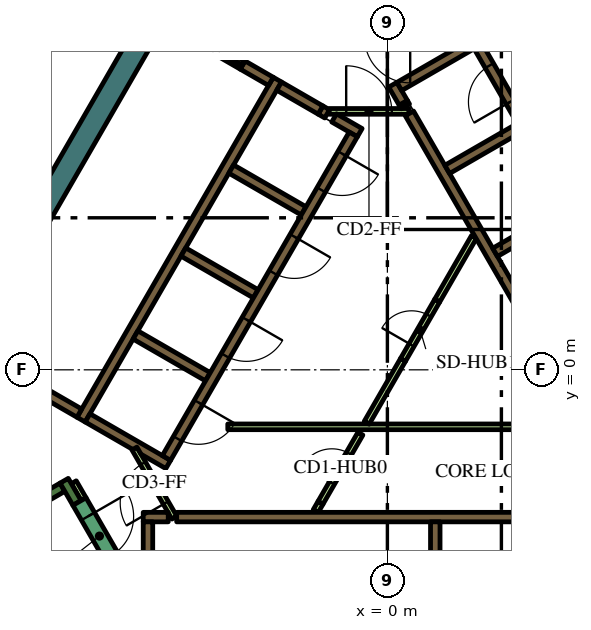
"""IFC4 building model, lengths in metres.
Left out: names, types, materials, properties, quantities, classifications, styles, units other than length and angle.
Written with IfcOpenShell. Run it as: python <this file> out.ifc"""

import sys

from ifc_helpers import new_model, si_unit, direction, frame, frame_2d, origin, place, context, subcontext, project, spatial, polyline, rectangle, outline, extrude, element, fill, save


model = new_model("IFC4")
c1 = context("Model", 3, precision=1e-05, world=origin(), true_north=direction((0.0, 1.0)))
c2 = subcontext(c1, "Body", "Model", "MODEL_VIEW")
j1 = project(units=[si_unit("LENGTHUNIT", "METRE"), si_unit("PLANEANGLEUNIT", "RADIAN")], contexts=[c1])
p1 = place(None, origin())
s1 = spatial("IfcSite", under=j1, at=p1, CompositionType="ELEMENT")
p2 = place(p1, origin())
s2 = spatial("IfcBuilding", under=s1, at=p2, CompositionType="ELEMENT")
p3 = place(p2, frame((0.0, 0.0, 327.6)))
s3 = spatial("IfcBuildingStorey", under=s2, at=p3, CompositionType="ELEMENT", Elevation=327.6)
p4 = place(p3, frame((1.989, 16.456, 0.0), z_axis=(0.0, 0.0, 1.0), x_axis=(0.49999102663, -0.8660305845, 0.0)))
e1 = element("IfcWall", 1, at=p4, inside=s3, PredefinedType="SOLIDWALL", context=c2, shape_type="SweptSolid", body=[
    extrude(rectangle(XDim=12.406, YDim=0.6, at=frame_2d((6.203, 0.0))), origin(), (0.0, 0.0, 1.0), 4.2),
])
p5 = place(p3, frame((-4.652, 11.842, 0.0), z_axis=(0.0, 0.0, 1.0), x_axis=(-0.500003640647, -0.866023301845, 0.0)))
e2 = element("IfcWall", 2, at=p5, inside=s3, PredefinedType="SOLIDWALL", context=c2, shape_type="SweptSolid", body=[
    extrude(rectangle(XDim=15.858, YDim=0.6, at=frame_2d((7.929, 0.0))), origin(), (0.0, 0.0, 1.0), 4.2),
])
p6 = place(p3, frame((-14.44, -6.49, 0.0), z_axis=(0.0, 0.0, 1.0), x_axis=(0.866022966069, 0.500004222222, 0.0)))
e3 = element("IfcWall", 3, at=p6, inside=s3, PredefinedType="SOLIDWALL", context=c2, shape_type="SweptSolid", body=[
    extrude(rectangle(XDim=6.8, YDim=0.25, at=frame_2d((3.4, 0.0))), origin(), (0.0, 0.0, 1.0), 4.2),
])
p7 = place(p3, frame((-8.168, -3.503, 0.0), z_axis=(0.0, 0.0, 1.0), x_axis=(-0.499952099219, 0.866053057547, 0.0)))
e4 = element("IfcWall", 4, at=p7, inside=s3, PredefinedType="SOLIDWALL", context=c2, shape_type="SweptSolid", body=[
    extrude(rectangle(XDim=0.675, YDim=0.25, at=frame_2d((0.337, 0.0))), origin(), (0.0, 0.0, 1.0), 4.2),
])
p8 = place(p3, frame((-5.545, -3.875, 0.0), z_axis=(0.0, 0.0, 1.0), x_axis=(1.0, 0.0, 0.0)))
e5 = element("IfcWall", 5, at=p8, inside=s3, PredefinedType="SOLIDWALL", context=c2, shape_type="SweptSolid", body=[
    extrude(rectangle(XDim=11.97, YDim=0.25, at=frame_2d((5.985, 0.0))), origin(), (0.0, 0.0, 1.0), 4.2),
])
p9 = place(p3, frame((-6.425, -3.875, 0.0), z_axis=(0.0, 0.0, 1.0), x_axis=(1.0, 0.0, 0.0)))
e6 = element("IfcWall", 6, at=p9, inside=s3, PredefinedType="SOLIDWALL", context=c2, shape_type="SweptSolid", body=[
    extrude(rectangle(XDim=0.658, YDim=0.25, at=frame_2d((0.329, 0.0))), origin(), (0.0, 0.0, 1.0), 4.2),
])
p10 = place(p3, frame((1.26, -4.0, 0.0), z_axis=(0.0, 0.0, 1.0), x_axis=(0.0, -1.0, 0.0)))
e7 = element("IfcWall", 7, at=p10, inside=s3, PredefinedType="SOLIDWALL", context=c2, shape_type="SweptSolid", body=[
    extrude(rectangle(XDim=2.2, YDim=0.25, at=frame_2d((1.1, 0.0))), origin(), (0.0, 0.0, 1.0), 4.2),
])
p11 = place(p3, frame((-6.3, -7.125, 0.0), z_axis=(0.0, 0.0, 1.0), x_axis=(0.0, 1.0, 0.0)))
e8 = element("IfcWall", 8, at=p11, inside=s3, PredefinedType="SOLIDWALL", context=c2, shape_type="SweptSolid", body=[
    extrude(rectangle(XDim=3.125, YDim=0.25, at=frame_2d((1.562, 0.0))), origin(), (0.0, 0.0, 1.0), 4.2),
])
p12 = place(p3, frame((0.473, 6.93, 0.0), z_axis=(0.0, 0.0, 1.0), x_axis=(-0.49972245349, 0.866185586049, 0.0)))
e9 = element("IfcWall", 9, at=p12, inside=s3, PredefinedType="SOLIDWALL", context=c2, shape_type="SweptSolid", body=[
    extrude(rectangle(XDim=0.11, YDim=0.25, at=frame_2d((0.055, 0.0))), origin(), (0.0, 0.0, 1.0), 4.2),
])
p13 = place(p3, frame((6.568, -3.627, 0.0), z_axis=(0.0, 0.0, 1.0), x_axis=(-0.499999455981, 0.866025717874, 0.0)))
e10 = element("IfcWall", 10, at=p13, inside=s3, PredefinedType="SOLIDWALL", context=c2, shape_type="SweptSolid", body=[
    extrude(rectangle(XDim=11.978, YDim=0.25, at=frame_2d((5.989, 0.0))), origin(), (0.0, 0.0, 1.0), 4.2),
])
p14 = place(p3, frame((0.417, 7.027, 0.0), z_axis=(0.0, 0.0, 1.0), x_axis=(-0.500210807569, 0.865903659763, 0.0)))
e11 = element("IfcWall", 11, at=p14, inside=s3, PredefinedType="SOLIDWALL", context=c2, shape_type="SweptSolid", body=[
    extrude(rectangle(XDim=0.548, YDim=0.25, at=frame_2d((0.274, 0.0))), origin(), (0.0, 0.0, 1.0), 4.2),
])
p15 = place(p3, frame((3.1, 9.064, 0.0), z_axis=(0.0, 0.0, 1.0), x_axis=(-0.866030133475, -0.499991807846, 0.0)))
e12 = element("IfcWall", 12, at=p15, inside=s3, PredefinedType="SOLIDWALL", context=c2, shape_type="SweptSolid", body=[
    extrude(rectangle(XDim=3.217, YDim=0.25, at=frame_2d((1.608, 0.0))), origin(), (0.0, 0.0, 1.0), 4.2),
])
p16 = place(p3, frame((1.574, 5.274, 0.0), z_axis=(0.0, 0.0, 1.0), x_axis=(0.866028486751, 0.499994660107, 0.0)))
e13 = element("IfcWall", 13, at=p16, inside=s3, PredefinedType="SOLIDWALL", context=c2, shape_type="SweptSolid", body=[
    extrude(rectangle(XDim=2.2, YDim=0.25, at=frame_2d((1.1, 0.0))), origin(), (0.0, 0.0, 1.0), 4.2),
])
p17 = place(p3, frame((2.834, 3.091, 0.0), z_axis=(0.0, 0.0, 1.0), x_axis=(0.866008176907, 0.50002983664, 0.0)))
e14 = element("IfcWall", 14, at=p17, inside=s3, PredefinedType="SOLIDWALL", context=c2, shape_type="SweptSolid", body=[
    extrude(rectangle(XDim=2.2, YDim=0.25, at=frame_2d((1.1, 0.0))), origin(), (0.0, 0.0, 1.0), 4.2),
])
p18 = place(p3, frame((-8.06, -1.311, 0.0), z_axis=(0.0, 0.0, 1.0), x_axis=(0.50000273126, 0.866023826885, 0.0)))
e15 = element("IfcWall", 15, at=p18, inside=s3, PredefinedType="SOLIDWALL", context=c2, shape_type="SweptSolid", body=[
    extrude(rectangle(XDim=10.33, YDim=0.25, at=frame_2d((5.165, 0.0))), origin(), (0.0, 0.0, 1.0), 4.2),
])
p19 = place(p3, frame((-1.758, 6.835, 0.0), z_axis=(0.0, 0.0, 1.0), x_axis=(0.865982457891, -0.500074377092, 0.0)))
e16 = element("IfcWall", 16, at=p19, inside=s3, PredefinedType="SOLIDWALL", context=c2, shape_type="SweptSolid", body=[
    extrude(rectangle(XDim=0.2, YDim=0.25, at=frame_2d((0.1, 0.0))), origin(), (0.0, 0.0, 1.0), 4.2),
])
p20 = place(p3, frame((-1.76, 6.836, 0.0), z_axis=(0.0, 0.0, 1.0), x_axis=(-0.865952863304, 0.500125622755, 0.0)))
e17 = element("IfcWall", 17, at=p20, inside=s3, PredefinedType="SOLIDWALL", context=c2, shape_type="SweptSolid", body=[
    extrude(rectangle(XDim=1.258, YDim=0.25, at=frame_2d((0.629, 0.0))), origin(), (0.0, 0.0, 1.0), 4.2),
])
p21 = place(p3, frame((-0.728, 6.24, 0.0), z_axis=(0.0, 0.0, 1.0), x_axis=(-0.865955664968, 0.500120771724, 0.0)))
e18 = element("IfcWall", 18, at=p21, inside=s3, PredefinedType="SOLIDWALL", context=c2, shape_type="SweptSolid", body=[
    extrude(rectangle(XDim=0.778, YDim=0.25, at=frame_2d((0.389, 0.0))), origin(), (0.0, 0.0, 1.0), 4.2),
])
for number, where, z_axis, x_axis in (
    (19, (-2.204, 4.182, 0.0), (0.0, 0.0, 1.0), (-0.866, 0.5, 0.0)),
    (20, (-5.369, 3.1, 0.0), (0.0, 0.0, 1.0), (0.866, -0.5, 0.0)),
    (21, (-4.724, -0.182, 0.0), (0.0, 0.0, 1.0), (-0.866, 0.5, 0.0)),
):
    element("IfcWall", number, at=place(p3, frame(where, z_axis=z_axis, x_axis=x_axis)), inside=s3, PredefinedType="SOLIDWALL", context=c2, shape_type="SweptSolid", body=[
        extrude(rectangle(XDim=2.2, YDim=0.25, at=frame_2d((1.1, 0.0))), origin(), (0.0, 0.0, 1.0), 4.2),
    ])
p22 = place(p3, origin())
e22 = element("IfcWall", 22, at=p22, inside=s3, PredefinedType="SOLIDWALL", context=c2, shape_type="SweptSolid", body=[
    extrude(outline(polyline([(-5.922, -2.257), (-5.922, -2.257), (-5.705, -2.382), (-5.83, -2.598), (-6.483, -2.221), (-6.591, -2.033), (-6.591, -2.033), (-6.7, -2.096), (-7.952, -1.373), (-7.827, -1.156), (-5.922, -2.257)])), origin(), (0.0, 0.0, 1.0), 4.2),
])
p23 = place(p3, frame((-8.106, -1.14, 0.0), z_axis=(0.0, 0.0, 1.0), x_axis=(-0.866008981251, 0.500028443584, 0.0)))
e23 = element("IfcWall", 23, at=p23, inside=s3, PredefinedType="SOLIDWALL", context=c2, shape_type="SweptSolid", body=[
    extrude(rectangle(XDim=3.2, YDim=0.25, at=frame_2d((1.6, 0.0))), origin(), (0.0, 0.0, 1.0), 4.2),
])
p24 = place(p3, frame((-3.066, 7.59, 0.0), z_axis=(0.0, 0.0, 1.0), x_axis=(-0.866081358704, 0.49990307071, 0.0)))
e24 = element("IfcWall", 24, at=p24, inside=s3, PredefinedType="SOLIDWALL", context=c2, shape_type="SweptSolid", body=[
    extrude(rectangle(XDim=0.858, YDim=0.25, at=frame_2d((0.429, 0.0))), origin(), (0.0, 0.0, 1.0), 4.2),
])
e25 = element("IfcWall", 25, at=p22, inside=s3, PredefinedType="SOLIDWALL", context=c2, shape_type="SweptSolid", body=[
    extrude(outline(polyline([(-3.748, 8.128), (-3.813, 8.015), (-4.027, 8.139), (-4.017, 8.156), (-4.008, 8.173), (-4.0, 8.192), (-3.995, 8.21), (-3.991, 8.23), (-3.99, 8.25), (-3.99, 8.268), (-3.748, 8.128)])), origin(), (0.0, 0.0, 1.0), 4.2),
])
p25 = place(p3, frame((-8.252, -2.958, 0.0), z_axis=(0.0, 0.0, 1.0), x_axis=(0.500174715838, -0.865924508047, 0.0)))
e26 = element("IfcWall", 26, at=p25, inside=s3, PredefinedType="PARTITIONING", context=c2, shape_type="SweptSolid", body=[
    extrude(rectangle(XDim=0.514, YDim=0.15, at=frame_2d((0.257, 0.0))), origin(), (0.0, 0.0, 1.0), 3.45),
])
p26 = place(p3, frame((-4.2, -1.5, 0.0), z_axis=(0.0, 0.0, 1.0), x_axis=(1.0, 0.0, 0.0)))
e27 = element("IfcWall", 27, at=p26, inside=s3, PredefinedType="PARTITIONING", context=c2, shape_type="SweptSolid", body=[
    extrude(rectangle(XDim=9.359, YDim=0.15, at=frame_2d((4.68, 0.0))), origin(), (0.0, 0.0, 1.0), 3.45),
])
p27 = place(p3, frame((-0.544, -1.393, 0.0), z_axis=(0.0, 0.0, 1.0), x_axis=(0.499928740635, 0.866066541489, 0.0)))
e28 = element("IfcWall", 28, at=p27, inside=s3, PredefinedType="PARTITIONING", context=c2, shape_type="SweptSolid", body=[
    extrude(rectangle(XDim=1.912, YDim=0.15, at=frame_2d((0.956, 0.0))), origin(), (0.0, 0.0, 1.0), 3.45),
])
p28 = place(p3, frame((1.312, 1.822, 0.0), z_axis=(0.0, 0.0, 1.0), x_axis=(0.500003549559, 0.866023354436, 0.0)))
e29 = element("IfcWall", 29, at=p28, inside=s3, PredefinedType="PARTITIONING", context=c2, shape_type="SweptSolid", body=[
    extrude(rectangle(XDim=1.93, YDim=0.15, at=frame_2d((0.965, 0.0))), origin(), (0.0, 0.0, 1.0), 3.45),
])
p29 = place(p3, frame((-1.887, -3.718, 0.0), z_axis=(0.0, 0.0, 1.0), x_axis=(0.500165633897, 0.865929753888, 0.0)))
e30 = element("IfcWall", 30, at=p29, inside=s3, PredefinedType="PARTITIONING", context=c2, shape_type="SweptSolid", body=[
    extrude(rectangle(XDim=0.254, YDim=0.15, at=frame_2d((0.127, 0.0))), origin(), (0.0, 0.0, 1.0), 3.45),
])
p30 = place(p3, frame((8.565, -2.185, 0.0), z_axis=(0.0, 0.0, 1.0), x_axis=(-0.499997954832, 0.866026584559, 0.0)))
e31 = element("IfcWall", 31, at=p30, inside=s3, PredefinedType="SOLIDWALL", context=c2, shape_type="SweptSolid", body=[
    extrude(rectangle(XDim=12.35, YDim=0.25, at=frame_2d((6.175, 0.0))), origin(), (0.0, 0.0, 1.0), 4.2),
])
p31 = place(p30, frame((0.685, 0.0, 0.0)))
e32 = element("IfcOpeningElement", 32, at=p31, cuts=e31, PredefinedType="OPENING", context=c2, shape_type="SweptSolid", body=[
    extrude(rectangle(XDim=0.9, YDim=2.1, at=frame_2d((0.45, 1.05))), frame((0.0, 0.135, 0.0), z_axis=(0.0, -1.0, 0.0), x_axis=(1.0, 0.0, 0.0)), (0.0, 0.0, 1.0), 0.27),
])
p32 = place(p30, frame((3.105, 0.0, 0.0)))
e33 = element("IfcOpeningElement", 33, at=p32, cuts=e31, PredefinedType="OPENING", context=c2, shape_type="SweptSolid", body=[
    extrude(rectangle(XDim=1.1, YDim=2.1, at=frame_2d((0.55, 1.05))), frame((0.0, 0.135, 0.0), z_axis=(0.0, -1.0, 0.0), x_axis=(1.0, 0.0, 0.0)), (0.0, 0.0, 1.0), 0.27),
])
p33 = place(p30, frame((5.625, 0.0, 0.0)))
e34 = element("IfcOpeningElement", 34, at=p33, cuts=e31, PredefinedType="OPENING", context=c2, shape_type="SweptSolid", body=[
    extrude(rectangle(XDim=1.1, YDim=2.1, at=frame_2d((0.55, 1.05))), frame((0.0, 0.135, 0.0), z_axis=(0.0, -1.0, 0.0), x_axis=(1.0, 0.0, 0.0)), (0.0, 0.0, 1.0), 0.27),
])
p34 = place(p30, frame((8.145, 0.0, 0.0)))
e35 = element("IfcOpeningElement", 35, at=p34, cuts=e31, PredefinedType="OPENING", context=c2, shape_type="SweptSolid", body=[
    extrude(rectangle(XDim=1.1, YDim=2.1, at=frame_2d((0.55, 1.05))), frame((0.0, 0.135, 0.0), z_axis=(0.0, -1.0, 0.0), x_axis=(1.0, 0.0, 0.0)), (0.0, 0.0, 1.0), 0.27),
])
p35 = place(p30, frame((10.665, 0.0, 0.0)))
e36 = element("IfcOpeningElement", 36, at=p35, cuts=e31, PredefinedType="OPENING", context=c2, shape_type="SweptSolid", body=[
    extrude(rectangle(XDim=1.1, YDim=2.1, at=frame_2d((0.55, 1.05))), frame((0.0, 0.135, 0.0), z_axis=(0.0, -1.0, 0.0), x_axis=(1.0, 0.0, 0.0)), (0.0, 0.0, 1.0), 0.27),
])
p36 = place(p3, frame((-0.898, 6.194, 0.0), z_axis=(0.0, 0.0, 1.0), x_axis=(-0.499996202215, -0.866027596426, 0.0)))
e37 = element("IfcWall", 37, at=p36, inside=s3, PredefinedType="SOLIDWALL", context=c2, shape_type="SweptSolid", body=[
    extrude(rectangle(XDim=9.83, YDim=0.25, at=frame_2d((4.915, 0.0))), origin(), (0.0, 0.0, 1.0), 4.2),
])
p37 = place(p36, frame((0.585, 0.0, 0.0)))
e38 = element("IfcOpeningElement", 38, at=p37, cuts=e37, PredefinedType="OPENING", context=c2, shape_type="SweptSolid", body=[
    extrude(rectangle(XDim=1.1, YDim=2.1, at=frame_2d((0.55, 1.05))), frame((0.0, 0.135, 0.0), z_axis=(0.0, -1.0, 0.0), x_axis=(1.0, 0.0, 0.0)), (0.0, 0.0, 1.0), 0.27),
])
p38 = place(p36, frame((3.105, 0.0, 0.0)))
e39 = element("IfcOpeningElement", 39, at=p38, cuts=e37, PredefinedType="OPENING", context=c2, shape_type="SweptSolid", body=[
    extrude(rectangle(XDim=1.1, YDim=2.1, at=frame_2d((0.55, 1.05))), frame((0.0, 0.135, 0.0), z_axis=(0.0, -1.0, 0.0), x_axis=(1.0, 0.0, 0.0)), (0.0, 0.0, 1.0), 0.27),
])
p39 = place(p36, frame((5.625, 0.0, 0.0)))
e40 = element("IfcOpeningElement", 40, at=p39, cuts=e37, PredefinedType="OPENING", context=c2, shape_type="SweptSolid", body=[
    extrude(rectangle(XDim=1.1, YDim=2.1, at=frame_2d((0.55, 1.05))), frame((0.0, 0.135, 0.0), z_axis=(0.0, -1.0, 0.0), x_axis=(1.0, 0.0, 0.0)), (0.0, 0.0, 1.0), 0.27),
])
p40 = place(p36, frame((8.145, 0.0, 0.0)))
e41 = element("IfcOpeningElement", 41, at=p40, cuts=e37, PredefinedType="OPENING", context=c2, shape_type="SweptSolid", body=[
    extrude(rectangle(XDim=1.1, YDim=2.1, at=frame_2d((0.55, 1.05))), frame((0.0, 0.135, 0.0), z_axis=(0.0, -1.0, 0.0), x_axis=(1.0, 0.0, 0.0)), (0.0, 0.0, 1.0), 0.27),
])
p41 = place(p3, frame((-8.103, -3.466, 0.0), z_axis=(0.0, 0.0, 1.0), x_axis=(0.500078061341, -0.865980330357, 0.0)))
e42 = element("IfcWall", 42, at=p41, inside=s3, PredefinedType="SOLIDWALL", context=c2, shape_type="SweptSolid", body=[
    extrude(rectangle(XDim=2.1, YDim=0.4, at=frame_2d((1.05, 0.0))), origin(), (0.0, 0.0, 1.0), 4.2),
])
p42 = place(p41, frame((0.45, 0.0, 0.0)))
e43 = element("IfcOpeningElement", 43, at=p42, cuts=e42, PredefinedType="OPENING", context=c2, shape_type="SweptSolid", body=[
    extrude(rectangle(XDim=1.2, YDim=2.1, at=frame_2d((0.6, 1.05))), frame((0.0, 0.21, 0.0), z_axis=(0.0, -1.0, 0.0), x_axis=(1.0, 0.0, 0.0)), (0.0, 0.0, 1.0), 0.42),
])
p43 = place(p3, frame((-1.76, -3.498, 0.0), z_axis=(0.0, 0.0, 1.0), x_axis=(0.499977374825, 0.866038466041, 0.0)))
e44 = element("IfcWall", 44, at=p43, inside=s3, PredefinedType="PARTITIONING", context=c2, shape_type="SweptSolid", body=[
    extrude(rectangle(XDim=2.1, YDim=0.15, at=frame_2d((1.05, 0.0))), origin(), (0.0, 0.0, 1.0), 3.45),
])
p44 = place(p43, frame((0.6, 0.0, 0.0)))
e45 = element("IfcOpeningElement", 45, at=p44, cuts=e44, PredefinedType="OPENING", context=c2, shape_type="SweptSolid", body=[
    extrude(rectangle(XDim=0.9, YDim=2.1, at=frame_2d((0.45, 1.05))), frame((0.0, 0.085, 0.0), z_axis=(0.0, -1.0, 0.0), x_axis=(1.0, 0.0, 0.0)), (0.0, 0.0, 1.0), 0.17),
])
p45 = place(p3, frame((-1.534, 6.8, 0.0), z_axis=(0.0, 0.0, 1.0), x_axis=(1.0, 0.0, 0.0)))
e46 = element("IfcWall", 46, at=p45, inside=s3, PredefinedType="PARTITIONING", context=c2, shape_type="SweptSolid", body=[
    extrude(rectangle(XDim=2.1, YDim=0.15, at=frame_2d((1.05, 0.0))), origin(), (0.0, 0.0, 1.0), 3.45),
])
p46 = place(p45, frame((0.45, 0.0, 0.0)))
e47 = element("IfcOpeningElement", 47, at=p46, cuts=e46, PredefinedType="OPENING", context=c2, shape_type="SweptSolid", body=[
    extrude(rectangle(XDim=1.2, YDim=2.1, at=frame_2d((0.6, 1.05))), frame((0.0, 0.085, 0.0), z_axis=(0.0, -1.0, 0.0), x_axis=(1.0, 0.0, 0.0)), (0.0, 0.0, 1.0), 0.17),
])
p47 = place(p3, frame((-5.606, -3.89, 0.0), z_axis=(0.0, 0.0, 1.0), x_axis=(-0.500027713859, 0.866009402589, 0.0)))
e48 = element("IfcWall", 48, at=p47, inside=s3, PredefinedType="PARTITIONING", context=c2, shape_type="SweptSolid", body=[
    extrude(rectangle(XDim=2.1, YDim=0.15, at=frame_2d((1.05, 0.0))), origin(), (0.0, 0.0, 1.0), 3.45),
])
p48 = place(p47, frame((0.45, 0.0, 0.0)))
e49 = element("IfcOpeningElement", 49, at=p48, cuts=e48, PredefinedType="OPENING", context=c2, shape_type="SweptSolid", body=[
    extrude(rectangle(XDim=1.2, YDim=2.1, at=frame_2d((0.6, 1.05))), frame((0.0, 0.085, 0.0), z_axis=(0.0, -1.0, 0.0), x_axis=(1.0, 0.0, 0.0)), (0.0, 0.0, 1.0), 0.17),
])
p49 = place(p3, frame((-5.659, 9.012, 0.0), z_axis=(0.0, 0.0, 1.0), x_axis=(0.866009402589, -0.500027713859, 0.0)))
e50 = element("IfcWall", 50, at=p49, inside=s3, PredefinedType="PARTITIONING", context=c2, shape_type="SweptSolid", body=[
    extrude(rectangle(XDim=2.1, YDim=0.12, at=frame_2d((1.05, 0.0))), origin(), (0.0, 0.0, 1.0), 3.45),
])
p50 = place(p49, frame((0.45, 0.0, 0.0)))
e51 = element("IfcOpeningElement", 51, at=p50, cuts=e50, PredefinedType="OPENING", context=c2, shape_type="SweptSolid", body=[
    extrude(rectangle(XDim=1.2, YDim=2.1, at=frame_2d((0.6, 1.05))), frame((0.0, 0.07, 0.0), z_axis=(0.0, -1.0, 0.0), x_axis=(1.0, 0.0, 0.0)), (0.0, 0.0, 1.0), 0.14),
])
p51 = place(p3, frame((0.412, 0.263, 0.0), z_axis=(0.0, 0.0, 1.0), x_axis=(0.500062916607, 0.865989075817, 0.0)))
e52 = element("IfcWall", 52, at=p51, inside=s3, PredefinedType="PARTITIONING", context=c2, shape_type="SweptSolid", body=[
    extrude(rectangle(XDim=1.8, YDim=0.15, at=frame_2d((0.9, 0.0))), origin(), (0.0, 0.0, 1.0), 3.45),
])
p52 = place(p51, frame((0.45, 0.0, 0.0)))
e53 = element("IfcOpeningElement", 53, at=p52, cuts=e52, PredefinedType="OPENING", context=c2, shape_type="SweptSolid", body=[
    extrude(rectangle(XDim=0.9, YDim=2.1, at=frame_2d((0.45, 1.05))), frame((0.0, 0.085, 0.0), z_axis=(0.0, -1.0, 0.0), x_axis=(1.0, 0.0, 0.0)), (0.0, 0.0, 1.0), 0.17),
])
p53 = place(p3, frame((-3.406, 18.6, 0.0), z_axis=(0.0, 0.0, 1.0), x_axis=(-0.499991334387, -0.866030406821, 0.0)))
e54 = element("IfcWall", 54, at=p53, inside=s3, PredefinedType="PARTITIONING", context=c2, shape_type="SweptSolid", body=[
    extrude(rectangle(XDim=12.235, YDim=0.15, at=frame_2d((6.118, 0.0))), origin(), (0.0, 0.0, 1.0), 3.45),
])
p54 = place(p53, frame((5.617, 0.0, 0.0)))
e55 = element("IfcOpeningElement", 55, at=p54, cuts=e54, PredefinedType="OPENING", context=c2, shape_type="SweptSolid", body=[
    extrude(rectangle(XDim=1.0, YDim=2.1, at=frame_2d((0.5, 1.05))), frame((0.0, 0.085, 0.0), z_axis=(0.0, -1.0, 0.0), x_axis=(1.0, 0.0, 0.0)), (0.0, 0.0, 1.0), 0.17),
])
p55 = place(p3, frame((-7.54, 16.64, 0.0), z_axis=(0.0, 0.0, 1.0), x_axis=(-0.500002158106, -0.866024157798, 0.0)))
e56 = element("IfcWall", 56, at=p55, inside=s3, PredefinedType="SOLIDWALL", context=c2, shape_type="SweptSolid", body=[
    extrude(rectangle(XDim=21.282, YDim=0.3, at=frame_2d((10.641, 0.0))), origin(), (0.0, 0.0, 1.0), 3.45),
])
p56 = place(p35, origin())
e57 = element("IfcDoor", 57, at=p56, inside=s3, OperationType="DOUBLE_DOOR_SLIDING", PredefinedType="DOOR", context=c2, shape_type="SweptSolid", body=[
    extrude(rectangle(XDim=1.1, YDim=2.1, at=frame_2d((0.55, 1.05))), frame((0.0, 0.025, 0.0), z_axis=(0.0, -1.0, 0.0), x_axis=(1.0, 0.0, 0.0)), (0.0, 0.0, 1.0), 0.05),
])
fill(e36, e57)
p57 = place(p37, origin())
e58 = element("IfcDoor", 58, at=p57, inside=s3, OperationType="DOUBLE_DOOR_SLIDING", PredefinedType="DOOR", context=c2, shape_type="SweptSolid", body=[
    extrude(rectangle(XDim=1.1, YDim=2.1, at=frame_2d((0.55, 1.05))), frame((0.0, 0.025, 0.0), z_axis=(0.0, -1.0, 0.0), x_axis=(1.0, 0.0, 0.0)), (0.0, 0.0, 1.0), 0.05),
])
fill(e38, e58)
p58 = place(p38, origin())
e59 = element("IfcDoor", 59, at=p58, inside=s3, OperationType="DOUBLE_DOOR_SLIDING", PredefinedType="DOOR", context=c2, shape_type="SweptSolid", body=[
    extrude(rectangle(XDim=1.1, YDim=2.1, at=frame_2d((0.55, 1.05))), frame((0.0, 0.025, 0.0), z_axis=(0.0, -1.0, 0.0), x_axis=(1.0, 0.0, 0.0)), (0.0, 0.0, 1.0), 0.05),
])
fill(e39, e59)
p59 = place(p39, origin())
e60 = element("IfcDoor", 60, at=p59, inside=s3, OperationType="DOUBLE_DOOR_SLIDING", PredefinedType="DOOR", context=c2, shape_type="SweptSolid", body=[
    extrude(rectangle(XDim=1.1, YDim=2.1, at=frame_2d((0.55, 1.05))), frame((0.0, 0.025, 0.0), z_axis=(0.0, -1.0, 0.0), x_axis=(1.0, 0.0, 0.0)), (0.0, 0.0, 1.0), 0.05),
])
fill(e40, e60)
p60 = place(p40, origin())
e61 = element("IfcDoor", 61, at=p60, inside=s3, OperationType="DOUBLE_DOOR_SLIDING", PredefinedType="DOOR", context=c2, shape_type="SweptSolid", body=[
    extrude(rectangle(XDim=1.1, YDim=2.1, at=frame_2d((0.55, 1.05))), frame((0.0, 0.025, 0.0), z_axis=(0.0, -1.0, 0.0), x_axis=(1.0, 0.0, 0.0)), (0.0, 0.0, 1.0), 0.05),
])
fill(e41, e61)
p61 = place(p42, origin())
e62 = element("IfcDoor", 62, at=p61, inside=s3, OperationType="SINGLE_SWING_LEFT", PredefinedType="DOOR", context=c2, shape_type="SweptSolid", body=[
    extrude(rectangle(XDim=1.2, YDim=2.1, at=frame_2d((0.6, 1.05))), frame((0.0, 0.025, 0.0), z_axis=(0.0, -1.0, 0.0), x_axis=(1.0, 0.0, 0.0)), (0.0, 0.0, 1.0), 0.05),
])
fill(e43, e62)
p62 = place(p44, origin())
e63 = element("IfcDoor", 63, at=p62, inside=s3, OperationType="SINGLE_SWING_LEFT", PredefinedType="DOOR", context=c2, shape_type="SweptSolid", body=[
    extrude(rectangle(XDim=0.9, YDim=2.1, at=frame_2d((0.45, 1.05))), frame((0.0, 0.025, 0.0), z_axis=(0.0, -1.0, 0.0), x_axis=(1.0, 0.0, 0.0)), (0.0, 0.0, 1.0), 0.05),
])
fill(e45, e63)
p63 = place(p46, origin())
e64 = element("IfcDoor", 64, at=p63, inside=s3, OperationType="SINGLE_SWING_LEFT", PredefinedType="DOOR", context=c2, shape_type="SweptSolid", body=[
    extrude(rectangle(XDim=1.2, YDim=2.1, at=frame_2d((0.6, 1.05))), frame((0.0, 0.025, 0.0), z_axis=(0.0, -1.0, 0.0), x_axis=(1.0, 0.0, 0.0)), (0.0, 0.0, 1.0), 0.05),
])
fill(e47, e64)
p64 = place(p48, origin())
e65 = element("IfcDoor", 65, at=p64, inside=s3, OperationType="SINGLE_SWING_LEFT", PredefinedType="DOOR", context=c2, shape_type="SweptSolid", body=[
    extrude(rectangle(XDim=1.2, YDim=2.1, at=frame_2d((0.6, 1.05))), frame((0.0, 0.025, 0.0), z_axis=(0.0, -1.0, 0.0), x_axis=(1.0, 0.0, 0.0)), (0.0, 0.0, 1.0), 0.05),
])
fill(e49, e65)
p65 = place(p50, origin())
e66 = element("IfcDoor", 66, at=p65, inside=s3, OperationType="SINGLE_SWING_LEFT", PredefinedType="DOOR", context=c2, shape_type="SweptSolid", body=[
    extrude(rectangle(XDim=1.2, YDim=2.1, at=frame_2d((0.6, 1.05))), frame((0.0, 0.025, 0.0), z_axis=(0.0, -1.0, 0.0), x_axis=(1.0, 0.0, 0.0)), (0.0, 0.0, 1.0), 0.05),
])
fill(e51, e66)
p66 = place(p52, origin())
e67 = element("IfcDoor", 67, at=p66, inside=s3, OperationType="SINGLE_SWING_LEFT", PredefinedType="DOOR", context=c2, shape_type="SweptSolid", body=[
    extrude(rectangle(XDim=0.9, YDim=2.1, at=frame_2d((0.45, 1.05))), frame((0.0, 0.025, 0.0), z_axis=(0.0, -1.0, 0.0), x_axis=(1.0, 0.0, 0.0)), (0.0, 0.0, 1.0), 0.05),
])
fill(e53, e67)
save(model, sys.argv[1])
